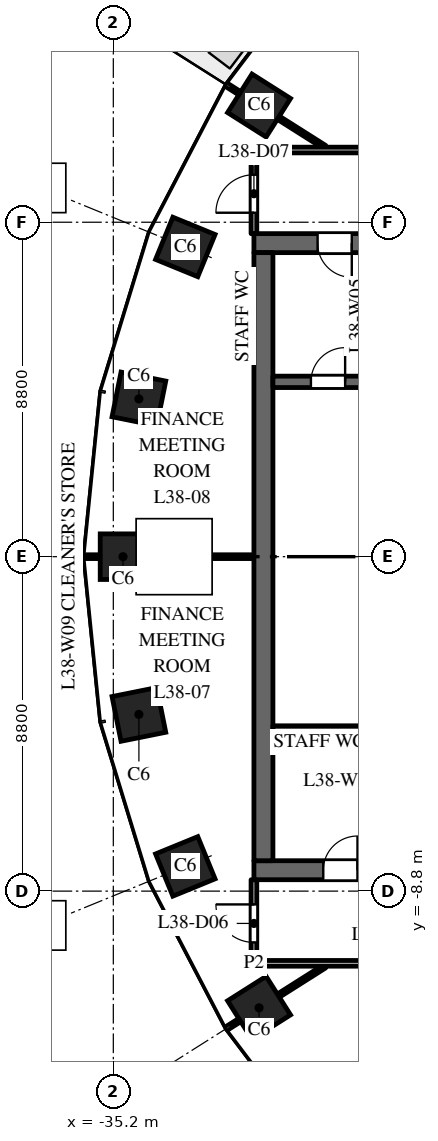
"""IFC4 building model, lengths in metres.
Left out: names, types, materials, properties, quantities, classifications, styles, units other than length and angle.
Written with IfcOpenShell. Run it as: python <this file> out.ifc"""

import sys

from ifc_helpers import new_model, si_unit, direction, frame, frame_2d, origin, origin_2d, place, context, subcontext, project, spatial, rectangle, extrude, element, fill, save


model = new_model("IFC4")
c1 = context("Model", 3, precision=1e-05, world=origin(), true_north=direction((0.0, 1.0)))
c2 = subcontext(c1, "Body", "Model", "MODEL_VIEW")
j1 = project(units=[si_unit("LENGTHUNIT", "METRE"), si_unit("PLANEANGLEUNIT", "RADIAN")], contexts=[c1])
p1 = place(None, origin())
s1 = spatial("IfcSite", under=j1, at=p1, CompositionType="ELEMENT")
p2 = place(p1, origin())
s2 = spatial("IfcBuilding", under=s1, at=p2, CompositionType="ELEMENT")
p3 = place(p2, frame((0.0, 0.0, 166.0)))
s3 = spatial("IfcBuildingStorey", under=s2, at=p3, CompositionType="ELEMENT", Elevation=166.0)
for number, where, z_axis, x_axis in (
    (1, (-31.365, 11.871, 0.0), (0.0, 0.0, 1.0), (-0.535, -0.845, 0.0)),
    (2, (-33.305, 8.149, 0.0), (0.0, 0.0, 1.0), (-0.379, -0.925, 0.0)),
    (3, (-34.527, 4.151, 0.0), (0.0, 0.0, 1.0), (-0.197, -0.98, 0.0)),
    (4, (-34.945, 0.0, 0.0), (0.0, 0.0, 1.0), (0.0, -1.0, 0.0)),
    (5, (-34.527, -4.151, 0.0), (0.0, 0.0, 1.0), (0.197, -0.98, 0.0)),
    (6, (-33.305, -8.149, 0.0), (0.0, 0.0, 1.0), (0.379, -0.925, 0.0)),
    (7, (-31.365, -11.871, 0.0), (0.0, 0.0, 1.0), (0.535, -0.845, 0.0)),
):
    element("IfcColumn", number, at=place(p3, frame(where, z_axis=z_axis, x_axis=x_axis)), inside=s3, PredefinedType="COLUMN", context=c2, shape_type="SweptSolid", body=[
        extrude(rectangle(XDim=1.2, YDim=1.2, at=origin_2d()), origin(), (0.0, 0.0, 1.0), 4.0),
    ])
p4 = place(p3, frame((-16.5, 8.25, 0.0), z_axis=(0.0, 0.0, 1.0), x_axis=(-1.0, 0.0, 0.0)))
e8 = element("IfcWall", 8, at=p4, inside=s3, PredefinedType="SHEAR", context=c2, shape_type="SweptSolid", body=[
    extrude(rectangle(XDim=15.0, YDim=0.5, at=frame_2d((7.5, 0.0))), origin(), (0.0, 0.0, 1.0), 3.7),
])
p5 = place(p4, frame((6.9, 0.0, 0.0)))
e9 = element("IfcOpeningElement", 9, at=p5, cuts=e8, PredefinedType="OPENING", context=c2, shape_type="SweptSolid", body=[
    extrude(rectangle(XDim=1.2, YDim=2.1, at=frame_2d((0.6, 1.05))), frame((0.0, 0.26, 0.0), z_axis=(0.0, -1.0, 0.0), x_axis=(1.0, 0.0, 0.0)), (0.0, 0.0, 1.0), 0.52),
])
p6 = place(p4, frame((12.425, 0.0, 0.0)))
e10 = element("IfcOpeningElement", 10, at=p6, cuts=e8, PredefinedType="OPENING", context=c2, shape_type="SweptSolid", body=[
    extrude(rectangle(XDim=0.9, YDim=2.1, at=frame_2d((0.45, 1.05))), frame((0.0, 0.26, 0.0), z_axis=(0.0, -1.0, 0.0), x_axis=(1.0, 0.0, 0.0)), (0.0, 0.0, 1.0), 0.52),
])
p7 = place(p3, frame((-16.5, -8.25, 0.0), z_axis=(0.0, 0.0, 1.0), x_axis=(-1.0, 0.0, 0.0)))
e11 = element("IfcWall", 11, at=p7, inside=s3, PredefinedType="SHEAR", context=c2, shape_type="SweptSolid", body=[
    extrude(rectangle(XDim=15.0, YDim=0.5, at=frame_2d((7.5, 0.0))), origin(), (0.0, 0.0, 1.0), 3.7),
])
p8 = place(p7, frame((6.9, 0.0, 0.0)))
e12 = element("IfcOpeningElement", 12, at=p8, cuts=e11, PredefinedType="OPENING", context=c2, shape_type="SweptSolid", body=[
    extrude(rectangle(XDim=1.2, YDim=2.1, at=frame_2d((0.6, 1.05))), frame((0.0, 0.26, 0.0), z_axis=(0.0, -1.0, 0.0), x_axis=(1.0, 0.0, 0.0)), (0.0, 0.0, 1.0), 0.52),
])
p9 = place(p7, frame((12.275, 0.0, 0.0)))
e13 = element("IfcOpeningElement", 13, at=p9, cuts=e11, PredefinedType="OPENING", context=c2, shape_type="SweptSolid", body=[
    extrude(rectangle(XDim=0.9, YDim=2.1, at=frame_2d((0.45, 1.05))), frame((0.0, 0.26, 0.0), z_axis=(0.0, -1.0, 0.0), x_axis=(1.0, 0.0, 0.0)), (0.0, 0.0, 1.0), 0.52),
])
p10 = place(p3, frame((-31.25, -8.0, 0.0), z_axis=(0.0, 0.0, 1.0), x_axis=(0.0, 1.0, 0.0)))
e14 = element("IfcWall", 14, at=p10, inside=s3, PredefinedType="SHEAR", context=c2, shape_type="SweptSolid", body=[
    extrude(rectangle(XDim=16.0, YDim=0.5, at=frame_2d((8.0, 0.0))), origin(), (0.0, 0.0, 1.0), 3.7),
])
p11 = place(p3, frame((-24.9, 4.6, 0.0), z_axis=(0.0, 0.0, 1.0), x_axis=(-1.0, 0.0, 0.0)))
e15 = element("IfcWall", 15, at=p11, inside=s3, PredefinedType="SHEAR", context=c2, shape_type="SweptSolid", body=[
    extrude(rectangle(XDim=6.1, YDim=0.3, at=frame_2d((3.05, 0.0))), origin(), (0.0, 0.0, 1.0), 3.7),
])
p12 = place(p11, frame((4.2, 0.0, 0.0)))
e16 = element("IfcOpeningElement", 16, at=p12, cuts=e15, PredefinedType="OPENING", context=c2, shape_type="SweptSolid", body=[
    extrude(rectangle(XDim=0.9, YDim=2.1, at=frame_2d((0.45, 1.05))), frame((0.0, 0.16, 0.0), z_axis=(0.0, -1.0, 0.0), x_axis=(1.0, 0.0, 0.0)), (0.0, 0.0, 1.0), 0.32),
])
p13 = place(p3, frame((-24.9, -4.6, 0.0), z_axis=(0.0, 0.0, 1.0), x_axis=(-1.0, 0.0, 0.0)))
e17 = element("IfcWall", 17, at=p13, inside=s3, PredefinedType="SHEAR", context=c2, shape_type="SweptSolid", body=[
    extrude(rectangle(XDim=6.1, YDim=0.3, at=frame_2d((3.05, 0.0))), origin(), (0.0, 0.0, 1.0), 3.7),
])
p14 = place(p3, frame((-35.949, 0.0, 0.0), z_axis=(0.0, 0.0, 1.0), x_axis=(1.0, 0.0, 0.0)))
e18 = element("IfcWall", 18, at=p14, inside=s3, PredefinedType="PARTITIONING", context=c2, shape_type="SweptSolid", body=[
    extrude(rectangle(XDim=4.449, YDim=0.1, at=frame_2d((2.225, 0.0))), origin(), (0.0, 0.0, 1.0), 2.9),
])
for number, where, z_axis, x_axis in (
    (19, (-32.212, -12.408, 0.0), (0.0, 0.0, 1.0), (0.845, 0.535, 0.0)),
    (20, (-32.212, 12.408, 0.0), (0.0, 0.0, 1.0), (0.845, -0.535, 0.0)),
):
    element("IfcWall", number, at=place(p3, frame(where, z_axis=z_axis, x_axis=x_axis)), inside=s3, PredefinedType="PARTITIONING", context=c2, shape_type="SweptSolid", body=[
        extrude(rectangle(XDim=3.048, YDim=0.1, at=frame_2d((1.524, 0.0))), origin(), (0.0, 0.0, 1.0), 3.7),
    ])
p15 = place(p3, frame((-31.5, -10.7, 0.0), z_axis=(0.0, 0.0, 1.0), x_axis=(0.0, 1.0, 0.0)))
e21 = element("IfcWall", 21, at=p15, inside=s3, PredefinedType="PARTITIONING", context=c2, shape_type="SweptSolid", body=[
    extrude(rectangle(XDim=2.2, YDim=0.15, at=frame_2d((1.1, 0.0))), origin(), (0.0, 0.0, 1.0), 3.7),
])
p16 = place(p15, frame((0.55, 0.0, 0.0)))
e22 = element("IfcOpeningElement", 22, at=p16, cuts=e21, PredefinedType="OPENING", context=c2, shape_type="SweptSolid", body=[
    extrude(rectangle(XDim=1.0, YDim=2.1, at=frame_2d((0.5, 1.05))), frame((0.0, 0.085, 0.0), z_axis=(0.0, -1.0, 0.0), x_axis=(1.0, 0.0, 0.0)), (0.0, 0.0, 1.0), 0.17),
])
p17 = place(p3, frame((-31.5, -10.7, 0.0), z_axis=(0.0, 0.0, 1.0), x_axis=(1.0, 0.0, 0.0)))
e23 = element("IfcWall", 23, at=p17, inside=s3, PredefinedType="PARTITIONING", context=c2, shape_type="SweptSolid", body=[
    extrude(rectangle(XDim=15.0, YDim=0.15, at=frame_2d((7.5, 0.0))), origin(), (0.0, 0.0, 1.0), 3.1),
])
p18 = place(p17, frame((4.379, 0.0, 0.0)))
e24 = element("IfcOpeningElement", 24, at=p18, cuts=e23, PredefinedType="OPENING", context=c2, shape_type="SweptSolid", body=[
    extrude(rectangle(XDim=1.0, YDim=2.1, at=frame_2d((0.5, 1.05))), frame((0.0, 0.085, 0.0), z_axis=(0.0, -1.0, 0.0), x_axis=(1.0, 0.0, 0.0)), (0.0, 0.0, 1.0), 0.17),
])
p19 = place(p17, frame((13.504, 0.0, 0.0)))
e25 = element("IfcOpeningElement", 25, at=p19, cuts=e23, PredefinedType="OPENING", context=c2, shape_type="SweptSolid", body=[
    extrude(rectangle(XDim=1.0, YDim=2.1, at=frame_2d((0.5, 1.05))), frame((0.0, 0.085, 0.0), z_axis=(0.0, -1.0, 0.0), x_axis=(1.0, 0.0, 0.0)), (0.0, 0.0, 1.0), 0.17),
])
p20 = place(p3, frame((-31.5, 8.5, 0.0), z_axis=(0.0, 0.0, 1.0), x_axis=(0.0, 1.0, 0.0)))
e26 = element("IfcWall", 26, at=p20, inside=s3, PredefinedType="PARTITIONING", context=c2, shape_type="SweptSolid", body=[
    extrude(rectangle(XDim=2.2, YDim=0.15, at=frame_2d((1.1, 0.0))), origin(), (0.0, 0.0, 1.0), 3.7),
])
p21 = place(p20, frame((0.55, 0.0, 0.0)))
e27 = element("IfcOpeningElement", 27, at=p21, cuts=e26, PredefinedType="OPENING", context=c2, shape_type="SweptSolid", body=[
    extrude(rectangle(XDim=1.0, YDim=2.1, at=frame_2d((0.5, 1.05))), frame((0.0, 0.085, 0.0), z_axis=(0.0, -1.0, 0.0), x_axis=(1.0, 0.0, 0.0)), (0.0, 0.0, 1.0), 0.17),
])
p22 = place(p3, frame((-31.5, 10.7, 0.0), z_axis=(0.0, 0.0, 1.0), x_axis=(1.0, 0.0, 0.0)))
e28 = element("IfcWall", 28, at=p22, inside=s3, PredefinedType="PARTITIONING", context=c2, shape_type="SweptSolid", body=[
    extrude(rectangle(XDim=15.0, YDim=0.15, at=frame_2d((7.5, 0.0))), origin(), (0.0, 0.0, 1.0), 3.1),
])
p23 = place(p22, frame((4.21, 0.0, 0.0)))
e29 = element("IfcOpeningElement", 29, at=p23, cuts=e28, PredefinedType="OPENING", context=c2, shape_type="SweptSolid", body=[
    extrude(rectangle(XDim=1.0, YDim=2.1, at=frame_2d((0.5, 1.05))), frame((0.0, 0.085, 0.0), z_axis=(0.0, -1.0, 0.0), x_axis=(1.0, 0.0, 0.0)), (0.0, 0.0, 1.0), 0.17),
])
p24 = place(p22, frame((13.35, 0.0, 0.0)))
e30 = element("IfcOpeningElement", 30, at=p24, cuts=e28, PredefinedType="OPENING", context=c2, shape_type="SweptSolid", body=[
    extrude(rectangle(XDim=1.0, YDim=2.1, at=frame_2d((0.5, 1.05))), frame((0.0, 0.085, 0.0), z_axis=(0.0, -1.0, 0.0), x_axis=(1.0, 0.0, 0.0)), (0.0, 0.0, 1.0), 0.17),
])
p25 = place(p6, origin())
e31 = element("IfcDoor", 31, at=p25, inside=s3, OperationType="SINGLE_SWING_RIGHT", PredefinedType="DOOR", context=c2, shape_type="SweptSolid", body=[
    extrude(rectangle(XDim=0.9, YDim=2.1, at=frame_2d((0.45, 1.05))), frame((0.0, 0.025, 0.0), z_axis=(0.0, -1.0, 0.0), x_axis=(1.0, 0.0, 0.0)), (0.0, 0.0, 1.0), 0.05),
])
fill(e10, e31)
p26 = place(p9, origin())
e32 = element("IfcDoor", 32, at=p26, inside=s3, OperationType="SINGLE_SWING_LEFT", PredefinedType="DOOR", context=c2, shape_type="SweptSolid", body=[
    extrude(rectangle(XDim=0.9, YDim=2.1, at=frame_2d((0.45, 1.05))), frame((0.0, 0.025, 0.0), z_axis=(0.0, -1.0, 0.0), x_axis=(1.0, 0.0, 0.0)), (0.0, 0.0, 1.0), 0.05),
])
fill(e13, e32)
p27 = place(p12, origin())
e33 = element("IfcDoor", 33, at=p27, inside=s3, OperationType="SINGLE_SWING_LEFT", PredefinedType="DOOR", context=c2, shape_type="SweptSolid", body=[
    extrude(rectangle(XDim=0.9, YDim=2.1, at=frame_2d((0.45, 1.05))), frame((0.0, 0.025, 0.0), z_axis=(0.0, -1.0, 0.0), x_axis=(1.0, 0.0, 0.0)), (0.0, 0.0, 1.0), 0.05),
])
fill(e16, e33)
p28 = place(p16, origin())
e34 = element("IfcDoor", 34, at=p28, inside=s3, OperationType="SINGLE_SWING_RIGHT", PredefinedType="DOOR", context=c2, shape_type="SweptSolid", body=[
    extrude(rectangle(XDim=1.0, YDim=2.1, at=frame_2d((0.5, 1.05))), frame((0.0, 0.025, 0.0), z_axis=(0.0, -1.0, 0.0), x_axis=(1.0, 0.0, 0.0)), (0.0, 0.0, 1.0), 0.05),
])
fill(e22, e34)
p29 = place(p21, origin())
e35 = element("IfcDoor", 35, at=p29, inside=s3, OperationType="SINGLE_SWING_LEFT", PredefinedType="DOOR", context=c2, shape_type="SweptSolid", body=[
    extrude(rectangle(XDim=1.0, YDim=2.1, at=frame_2d((0.5, 1.05))), frame((0.0, 0.025, 0.0), z_axis=(0.0, -1.0, 0.0), x_axis=(1.0, 0.0, 0.0)), (0.0, 0.0, 1.0), 0.05),
])
fill(e27, e35)
save(model, sys.argv[1])
